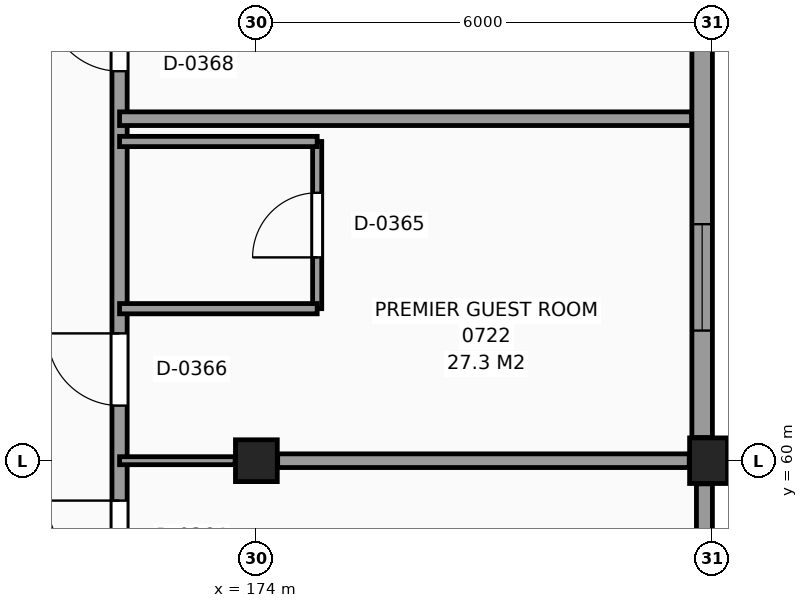
"""IFC4 building model, lengths in metres.
Left out: names, types, materials, properties, quantities, classifications, styles, units other than length and angle.
Written with IfcOpenShell. Run it as: python <this file> out.ifc"""

import sys

from ifc_helpers import new_model, si_unit, direction, frame, frame_2d, origin, origin_2d, place, context, subcontext, project, spatial, rectangle, extrude, element, fill, save


model = new_model("IFC4")
c1 = context("Model", 3, precision=1e-05, world=origin(), true_north=direction((0.0, 1.0)))
c2 = subcontext(c1, "Body", "Model", "MODEL_VIEW")
j1 = project(units=[si_unit("LENGTHUNIT", "METRE"), si_unit("PLANEANGLEUNIT", "RADIAN")], contexts=[c1])
p1 = place(None, origin())
s1 = spatial("IfcSite", under=j1, at=p1, CompositionType="ELEMENT")
p2 = place(p1, origin())
s2 = spatial("IfcBuilding", under=s1, at=p2, CompositionType="ELEMENT")
p3 = place(p2, frame((0.0, 0.0, 31.5)))
s3 = spatial("IfcBuildingStorey", under=s2, at=p3, CompositionType="ELEMENT", Elevation=31.5)
p4 = place(p3, frame((174.0, 60.0, 0.0), z_axis=(0.0, 0.0, 1.0), x_axis=(1.0, 0.0, 0.0)))
e1 = element("IfcColumn", 1, at=p4, inside=s3, PredefinedType="COLUMN", context=c2, shape_type="SweptSolid", body=[
    extrude(rectangle(XDim=0.55, YDim=0.55, at=origin_2d()), origin(), (0.0, 0.0, 1.0), 3.3),
])
p5 = place(p3, frame((180.0, 60.0, 0.0), z_axis=(0.0, 0.0, 1.0), x_axis=(1.0, 0.0, 0.0)))
e2 = element("IfcColumn", 2, at=p5, inside=s3, PredefinedType="COLUMN", context=c2, shape_type="SweptSolid", body=[
    extrude(rectangle(XDim=0.6, YDim=0.6, at=origin_2d()), origin(), (0.0, 0.0, 1.0), 3.3),
])
p6 = place(p3, frame((179.895, 54.305, 0.0), z_axis=(0.0, 0.0, 1.0), x_axis=(0.0, 1.0, 0.0)))
e3 = element("IfcWall", 3, at=p6, inside=s3, PredefinedType="SOLIDWALL", context=c2, shape_type="SweptSolid", body=[
    extrude(rectangle(XDim=5.39, YDim=0.21, at=frame_2d((2.695, 0.0))), origin(), (0.0, 0.0, 1.0), 2.42),
])
p7 = place(p6, frame((2.583, 0.0, 0.8)))
e4 = element("IfcOpeningElement", 4, at=p7, cuts=e3, PredefinedType="OPENING", context=c2, shape_type="SweptSolid", body=[
    extrude(rectangle(XDim=1.4, YDim=1.4, at=frame_2d((0.7, 0.7))), frame((0.0, 0.115, 0.0), z_axis=(0.0, -1.0, 0.0), x_axis=(1.0, 0.0, 0.0)), (0.0, 0.0, 1.0), 0.23),
])
p8 = place(p3, frame((179.865, 60.305, 0.0), z_axis=(0.0, 0.0, 1.0), x_axis=(0.0, 1.0, 0.0)))
e5 = element("IfcWall", 5, at=p8, inside=s3, PredefinedType="SOLIDWALL", context=c2, shape_type="SweptSolid", body=[
    extrude(rectangle(XDim=5.39, YDim=0.27, at=frame_2d((2.695, 0.0))), origin(), (0.0, 0.0, 1.0), 2.42),
])
p9 = place(p8, frame((1.407, 0.0, 0.8)))
e6 = element("IfcOpeningElement", 6, at=p9, cuts=e5, PredefinedType="OPENING", context=c2, shape_type="SweptSolid", body=[
    extrude(rectangle(XDim=1.4, YDim=1.4, at=frame_2d((0.7, 0.7))), frame((0.0, 0.145, 0.0), z_axis=(0.0, -1.0, 0.0), x_axis=(1.0, 0.0, 0.0)), (0.0, 0.0, 1.0), 0.29),
])
p10 = place(p3, frame((172.2, 42.255, 0.0), z_axis=(0.0, 0.0, 1.0), x_axis=(0.0, 1.0, 0.0)))
e7 = element("IfcWall", 7, at=p10, inside=s3, PredefinedType="PARTITIONING", context=c2, shape_type="SweptSolid", body=[
    extrude(rectangle(XDim=65.565, YDim=0.2, at=frame_2d((32.783, 0.0))), origin(), (0.0, 0.0, 1.0), 3.07),
])
p11 = place(p10, frame((0.42, 0.0, 0.0)))
e8 = element("IfcOpeningElement", 8, at=p11, cuts=e7, PredefinedType="OPENING", context=c2, shape_type="SweptSolid", body=[
    extrude(rectangle(XDim=0.95, YDim=2.1, at=frame_2d((0.475, 1.05))), frame((0.0, 0.11, 0.0), z_axis=(0.0, -1.0, 0.0), x_axis=(1.0, 0.0, 0.0)), (0.0, 0.0, 1.0), 0.22),
])
p12 = place(p10, frame((6.47, 0.0, 0.0)))
e9 = element("IfcOpeningElement", 9, at=p12, cuts=e7, PredefinedType="OPENING", context=c2, shape_type="SweptSolid", body=[
    extrude(rectangle(XDim=0.95, YDim=2.1, at=frame_2d((0.475, 1.05))), frame((0.0, 0.11, 0.0), z_axis=(0.0, -1.0, 0.0), x_axis=(1.0, 0.0, 0.0)), (0.0, 0.0, 1.0), 0.22),
])
p13 = place(p10, frame((16.27, 0.0, 0.0)))
e10 = element("IfcOpeningElement", 10, at=p13, cuts=e7, PredefinedType="OPENING", context=c2, shape_type="SweptSolid", body=[
    extrude(rectangle(XDim=0.95, YDim=2.1, at=frame_2d((0.475, 1.05))), frame((0.0, 0.11, 0.0), z_axis=(0.0, -1.0, 0.0), x_axis=(1.0, 0.0, 0.0)), (0.0, 0.0, 1.0), 0.22),
])
p14 = place(p10, frame((18.47, 0.0, 0.0)))
e11 = element("IfcOpeningElement", 11, at=p14, cuts=e7, PredefinedType="OPENING", context=c2, shape_type="SweptSolid", body=[
    extrude(rectangle(XDim=0.95, YDim=2.1, at=frame_2d((0.475, 1.05))), frame((0.0, 0.11, 0.0), z_axis=(0.0, -1.0, 0.0), x_axis=(1.0, 0.0, 0.0)), (0.0, 0.0, 1.0), 0.22),
])
p15 = place(p10, frame((22.87, 0.0, 0.0)))
e12 = element("IfcOpeningElement", 12, at=p15, cuts=e7, PredefinedType="OPENING", context=c2, shape_type="SweptSolid", body=[
    extrude(rectangle(XDim=0.95, YDim=2.1, at=frame_2d((0.475, 1.05))), frame((0.0, 0.11, 0.0), z_axis=(0.0, -1.0, 0.0), x_axis=(1.0, 0.0, 0.0)), (0.0, 0.0, 1.0), 0.22),
])
p16 = place(p10, frame((27.37, 0.0, 0.0)))
e13 = element("IfcOpeningElement", 13, at=p16, cuts=e7, PredefinedType="OPENING", context=c2, shape_type="SweptSolid", body=[
    extrude(rectangle(XDim=0.95, YDim=2.1, at=frame_2d((0.475, 1.05))), frame((0.0, 0.11, 0.0), z_axis=(0.0, -1.0, 0.0), x_axis=(1.0, 0.0, 0.0)), (0.0, 0.0, 1.0), 0.22),
])
p17 = place(p10, frame((36.47, 0.0, 0.0)))
e14 = element("IfcOpeningElement", 14, at=p17, cuts=e7, PredefinedType="OPENING", context=c2, shape_type="SweptSolid", body=[
    extrude(rectangle(XDim=0.95, YDim=2.1, at=frame_2d((0.475, 1.05))), frame((0.0, 0.11, 0.0), z_axis=(0.0, -1.0, 0.0), x_axis=(1.0, 0.0, 0.0)), (0.0, 0.0, 1.0), 0.22),
])
p18 = place(p10, frame((40.87, 0.0, 0.0)))
e15 = element("IfcOpeningElement", 15, at=p18, cuts=e7, PredefinedType="OPENING", context=c2, shape_type="SweptSolid", body=[
    extrude(rectangle(XDim=0.95, YDim=2.1, at=frame_2d((0.475, 1.05))), frame((0.0, 0.11, 0.0), z_axis=(0.0, -1.0, 0.0), x_axis=(1.0, 0.0, 0.0)), (0.0, 0.0, 1.0), 0.22),
])
p19 = place(p10, frame((48.07, 0.0, 0.0)))
e16 = element("IfcOpeningElement", 16, at=p19, cuts=e7, PredefinedType="OPENING", context=c2, shape_type="SweptSolid", body=[
    extrude(rectangle(XDim=0.95, YDim=2.1, at=frame_2d((0.475, 1.05))), frame((0.0, 0.11, 0.0), z_axis=(0.0, -1.0, 0.0), x_axis=(1.0, 0.0, 0.0)), (0.0, 0.0, 1.0), 0.22),
])
p20 = place(p10, frame((56.32, 0.0, 0.0)))
e17 = element("IfcOpeningElement", 17, at=p20, cuts=e7, PredefinedType="OPENING", context=c2, shape_type="SweptSolid", body=[
    extrude(rectangle(XDim=0.95, YDim=2.1, at=frame_2d((0.475, 1.05))), frame((0.0, 0.11, 0.0), z_axis=(0.0, -1.0, 0.0), x_axis=(1.0, 0.0, 0.0)), (0.0, 0.0, 1.0), 0.22),
])
p21 = place(p10, frame((60.47, 0.0, 0.0)))
e18 = element("IfcOpeningElement", 18, at=p21, cuts=e7, PredefinedType="OPENING", context=c2, shape_type="SweptSolid", body=[
    extrude(rectangle(XDim=0.95, YDim=2.1, at=frame_2d((0.475, 1.05))), frame((0.0, 0.11, 0.0), z_axis=(0.0, -1.0, 0.0), x_axis=(1.0, 0.0, 0.0)), (0.0, 0.0, 1.0), 0.22),
])
p22 = place(p3, frame((174.8, 62.0, 0.0), z_axis=(0.0, 0.0, 1.0), x_axis=(0.0, 1.0, 0.0)))
e19 = element("IfcWall", 19, at=p22, inside=s3, PredefinedType="PARTITIONING", context=c2, shape_type="SweptSolid", body=[
    extrude(rectangle(XDim=2.2, YDim=0.12, at=frame_2d((1.1, 0.0))), origin(), (0.0, 0.0, 1.0), 3.07),
])
p23 = place(p22, frame((0.675, 0.0, 0.0)))
e20 = element("IfcOpeningElement", 20, at=p23, cuts=e19, PredefinedType="OPENING", context=c2, shape_type="SweptSolid", body=[
    extrude(rectangle(XDim=0.85, YDim=2.1, at=frame_2d((0.425, 1.05))), frame((0.0, 0.07, 0.0), z_axis=(0.0, -1.0, 0.0), x_axis=(1.0, 0.0, 0.0)), (0.0, 0.0, 1.0), 0.14),
])
p24 = place(p3, frame((172.2, 60.0, 0.0), z_axis=(0.0, 0.0, 1.0), x_axis=(1.0, 0.0, 0.0)))
e21 = element("IfcWall", 21, at=p24, inside=s3, PredefinedType="PARTITIONING", context=c2, shape_type="SweptSolid", body=[
    extrude(rectangle(XDim=1.52, YDim=0.105, at=frame_2d((0.76, 0.0))), origin(), (0.0, 0.0, 1.0), 2.27),
])
p25 = place(p3, frame((174.28, 60.0, 0.0), z_axis=(0.0, 0.0, 1.0), x_axis=(1.0, 0.0, 0.0)))
e22 = element("IfcWall", 22, at=p25, inside=s3, PredefinedType="PARTITIONING", context=c2, shape_type="SweptSolid", body=[
    extrude(rectangle(XDim=5.415, YDim=0.18, at=frame_2d((2.708, 0.0))), origin(), (0.0, 0.0, 1.0), 2.27),
])
for number, where, z_axis, x_axis in (
    (23, (172.2, 62.0, 0.0), (0.0, 0.0, 1.0), (1.0, 0.0, 0.0)),
    (24, (172.2, 64.2, 0.0), (0.0, 0.0, 1.0), (1.0, 0.0, 0.0)),
):
    element("IfcWall", number, at=place(p3, frame(where, z_axis=z_axis, x_axis=x_axis)), inside=s3, PredefinedType="PARTITIONING", context=c2, shape_type="SweptSolid", body=[
        extrude(rectangle(XDim=2.6, YDim=0.135, at=frame_2d((1.3, 0.0))), origin(), (0.0, 0.0, 1.0), 3.07),
    ])
p26 = place(p3, frame((172.2, 64.5, 0.0), z_axis=(0.0, 0.0, 1.0), x_axis=(1.0, 0.0, 0.0)))
e25 = element("IfcWall", 25, at=p26, inside=s3, PredefinedType="PARTITIONING", context=c2, shape_type="SweptSolid", body=[
    extrude(rectangle(XDim=7.525, YDim=0.18, at=frame_2d((3.763, 0.0))), origin(), (0.0, 0.0, 1.0), 3.07),
])
p27 = place(p9, origin())
e26 = element("IfcWindow", 26, at=p27, inside=s3, PartitioningType="SINGLE_PANEL", PredefinedType="WINDOW", context=c2, shape_type="SweptSolid", body=[
    extrude(rectangle(XDim=1.4, YDim=1.4, at=frame_2d((0.7, 0.7))), frame((0.0, 0.03, 0.0), z_axis=(0.0, -1.0, 0.0), x_axis=(1.0, 0.0, 0.0)), (0.0, 0.0, 1.0), 0.06),
])
fill(e6, e26)
p28 = place(p13, origin())
e27 = element("IfcDoor", 27, at=p28, inside=s3, OperationType="SINGLE_SWING_RIGHT", PredefinedType="DOOR", context=c2, shape_type="SweptSolid", body=[
    extrude(rectangle(XDim=0.95, YDim=2.1, at=frame_2d((0.475, 1.05))), frame((0.0, 0.025, 0.0), z_axis=(0.0, -1.0, 0.0), x_axis=(1.0, 0.0, 0.0)), (0.0, 0.0, 1.0), 0.05),
])
fill(e10, e27)
p29 = place(p23, origin())
e28 = element("IfcDoor", 28, at=p29, inside=s3, OperationType="SINGLE_SWING_LEFT", PredefinedType="DOOR", context=c2, shape_type="SweptSolid", body=[
    extrude(rectangle(XDim=0.85, YDim=2.1, at=frame_2d((0.425, 1.05))), frame((0.0, 0.025, 0.0), z_axis=(0.0, -1.0, 0.0), x_axis=(1.0, 0.0, 0.0)), (0.0, 0.0, 1.0), 0.05),
])
fill(e20, e28)
p30 = place(p14, origin())
e29 = element("IfcDoor", 29, at=p30, inside=s3, OperationType="SINGLE_SWING_RIGHT", PredefinedType="DOOR", context=c2, shape_type="SweptSolid", body=[
    extrude(rectangle(XDim=0.95, YDim=2.1, at=frame_2d((0.475, 1.05))), frame((0.0, 0.025, 0.0), z_axis=(0.0, -1.0, 0.0), x_axis=(1.0, 0.0, 0.0)), (0.0, 0.0, 1.0), 0.05),
])
fill(e11, e29)
p31 = place(p15, origin())
e30 = element("IfcDoor", 30, at=p31, inside=s3, OperationType="SINGLE_SWING_RIGHT", PredefinedType="DOOR", context=c2, shape_type="SweptSolid", body=[
    extrude(rectangle(XDim=0.95, YDim=2.1, at=frame_2d((0.475, 1.05))), frame((0.0, 0.025, 0.0), z_axis=(0.0, -1.0, 0.0), x_axis=(1.0, 0.0, 0.0)), (0.0, 0.0, 1.0), 0.05),
])
fill(e12, e30)
save(model, sys.argv[1])
